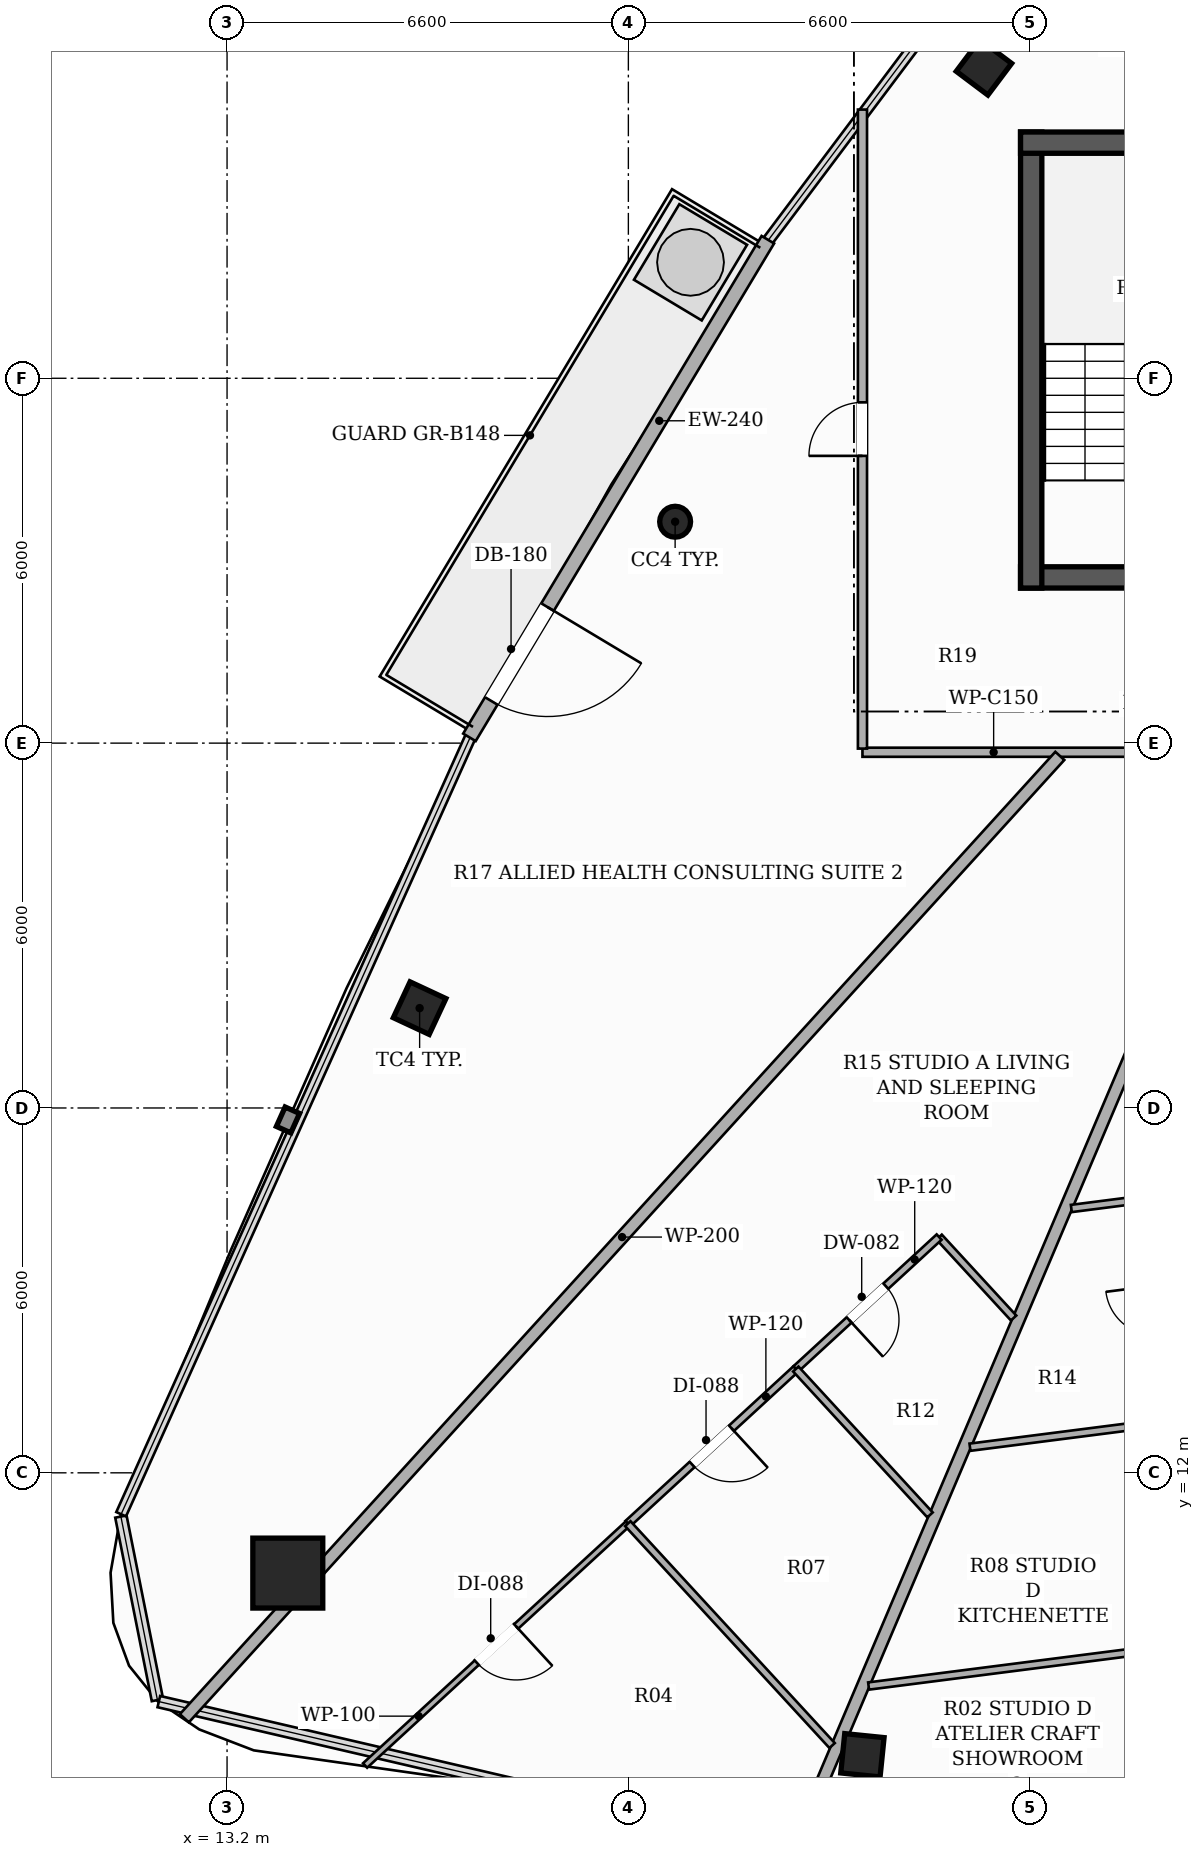
"""IFC4 building model, lengths in metres.
Left out: names, types, materials, properties, quantities, classifications, styles, units other than length and angle.
Written with IfcOpenShell. Run it as: python <this file> out.ifc"""

import sys

from ifc_helpers import new_model, si_unit, direction, frame, frame_2d, origin, origin_2d, place, context, subcontext, project, spatial, rectangle, hollow_rectangle, hollow_circle, extrude, element, fill, save


model = new_model("IFC4")
c1 = context("Model", 3, precision=1e-05, world=origin(), true_north=direction((0.0, 1.0)))
c2 = subcontext(c1, "Body", "Model", "MODEL_VIEW")
j1 = project(units=[si_unit("LENGTHUNIT", "METRE"), si_unit("PLANEANGLEUNIT", "RADIAN")], contexts=[c1])
p1 = place(None, origin())
s1 = spatial("IfcSite", under=j1, at=p1, CompositionType="ELEMENT")
p2 = place(p1, origin())
s2 = spatial("IfcBuilding", under=s1, at=p2, CompositionType="ELEMENT")
p3 = place(p2, frame((0.0, 0.0, 270.05)))
s3 = spatial("IfcBuildingStorey", under=s2, at=p3, CompositionType="ELEMENT", Elevation=270.05)
p4 = place(p3, frame((26.25, 26.725, 0.0), z_axis=(0.0, 0.0, 1.0), x_axis=(1.0, 0.0, 0.0)))
e1 = element("IfcWall", 1, at=p4, inside=s3, PredefinedType="SHEAR", context=c2, shape_type="SweptSolid", body=[
    extrude(rectangle(XDim=13.5, YDim=0.35, at=frame_2d((6.75, 0.0))), origin(), (0.0, 0.0, 1.0), 3.3),
])
p5 = place(p4, frame((4.35, 0.0, 0.0)))
e2 = element("IfcOpeningElement", 2, at=p5, cuts=e1, PredefinedType="OPENING", context=c2, shape_type="SweptSolid", body=[
    extrude(rectangle(XDim=1.05, YDim=2.15, at=frame_2d((0.525, 1.075))), frame((0.0, 0.185, 0.0), z_axis=(0.0, -1.0, 0.0), x_axis=(1.0, 0.0, 0.0)), (0.0, 0.0, 1.0), 0.37),
])
p6 = place(p4, frame((8.3, 0.0, 0.0)))
e3 = element("IfcOpeningElement", 3, at=p6, cuts=e1, PredefinedType="OPENING", context=c2, shape_type="SweptSolid", body=[
    extrude(rectangle(XDim=1.05, YDim=2.15, at=frame_2d((0.525, 1.075))), frame((0.0, 0.185, 0.0), z_axis=(0.0, -1.0, 0.0), x_axis=(1.0, 0.0, 0.0)), (0.0, 0.0, 1.0), 0.37),
])
p7 = place(p3, frame((26.425, 26.55, 0.0), z_axis=(0.0, 0.0, 1.0), x_axis=(0.0, 1.0, 0.0)))
e4 = element("IfcWall", 4, at=p7, inside=s3, PredefinedType="SHEAR", context=c2, shape_type="SweptSolid", body=[
    extrude(rectangle(XDim=7.5, YDim=0.35, at=frame_2d((3.75, 0.0))), origin(), (0.0, 0.0, 1.0), 3.3),
])
p8 = place(p3, frame((26.25, 33.875, 0.0), z_axis=(0.0, 0.0, 1.0), x_axis=(1.0, 0.0, 0.0)))
e5 = element("IfcWall", 5, at=p8, inside=s3, PredefinedType="SHEAR", context=c2, shape_type="SweptSolid", body=[
    extrude(rectangle(XDim=3.6, YDim=0.35, at=frame_2d((1.8, 0.0))), origin(), (0.0, 0.0, 1.0), 3.3),
])
p9 = place(p3, frame((14.199, 10.351, 0.0), z_axis=(0.0, 0.0, 1.0), x_axis=(1.0, 0.0, 0.0)))
e6 = element("IfcColumn", 6, at=p9, inside=s3, PredefinedType="COLUMN", context=c2, shape_type="SweptSolid", body=[
    extrude(hollow_rectangle(XDim=1.15, YDim=1.15, WallThickness=0.036, at=origin_2d()), origin(), (0.0, 0.0, 1.0), 3.3),
])
p10 = place(p3, frame((25.648, 35.113, 0.0), z_axis=(0.0, 0.0, 1.0), x_axis=(0.600420225326, 0.799684658487, 0.0)))
e7 = element("IfcColumn", 7, at=p10, inside=s3, PredefinedType="COLUMN", context=c2, shape_type="SweptSolid", body=[
    extrude(hollow_rectangle(XDim=0.65, YDim=0.65, WallThickness=0.022, at=origin_2d()), origin(), (0.0, 0.0, 1.0), 3.3),
])
p11 = place(p3, frame((20.569, 27.641, 0.0), z_axis=(0.0, 0.0, 1.0), x_axis=(1.0, 0.0, 0.0)))
e8 = element("IfcColumn", 8, at=p11, inside=s3, PredefinedType="COLUMN", context=c2, shape_type="SweptSolid", body=[
    extrude(hollow_circle(Radius=0.254, WallThickness=0.016, at=origin_2d()), origin(), (0.0, 0.0, 1.0), 3.3),
])
for number, where, z_axis, x_axis in (
    (9, (16.367, 19.642, 0.0), (0.0, 0.0, 1.0), (0.423, 0.906, 0.0)),
    (10, (23.649, 7.355, 0.0), (0.0, 0.0, 1.0), (-0.995, 0.101, 0.0)),
):
    element("IfcColumn", number, at=place(p3, frame(where, z_axis=z_axis, x_axis=x_axis)), inside=s3, PredefinedType="COLUMN", context=c2, shape_type="SweptSolid", body=[
        extrude(hollow_rectangle(XDim=0.65, YDim=0.65, WallThickness=0.022, at=origin_2d()), origin(), (0.0, 0.0, 1.0), 3.3),
    ])
p12 = place(p3, frame((22.094, 32.279, 0.0), z_axis=(0.0, 0.0, 1.0), x_axis=(-0.514303866757, -0.857608029719, 0.0)))
e11 = element("IfcWall", 11, at=p12, inside=s3, PredefinedType="SOLIDWALL", context=c2, shape_type="SweptSolid", body=[
    extrude(rectangle(XDim=9.543, YDim=0.24, at=frame_2d((4.771, 0.0))), origin(), (0.0, 0.0, 1.0), 2.624),
])
p13 = place(p12, frame((7.045, 0.0, 0.0)))
e12 = element("IfcOpeningElement", 12, at=p13, cuts=e11, PredefinedType="OPENING", context=c2, shape_type="SweptSolid", body=[
    extrude(rectangle(XDim=1.8, YDim=2.2, at=frame_2d((0.9, 1.1))), frame((0.0, 0.13, 0.0), z_axis=(0.0, -1.0, 0.0), x_axis=(1.0, 0.0, 0.0)), (0.0, 0.0, 1.0), 0.26),
])
p14 = place(p3, frame((32.168, 23.85, 0.0), z_axis=(0.0, 0.0, 1.0), x_axis=(-1.0, 0.0, 0.0)))
e13 = element("IfcWall", 13, at=p14, inside=s3, PredefinedType="PARTITIONING", context=c2, shape_type="SweptSolid", body=[
    extrude(rectangle(XDim=8.518, YDim=0.15, at=frame_2d((4.259, 0.0))), origin(), (0.0, 0.0, 1.0), 2.565),
])
p15 = place(p14, frame((3.183, 0.0, 0.0)))
e14 = element("IfcOpeningElement", 14, at=p15, cuts=e13, PredefinedType="OPENING", context=c2, shape_type="SweptSolid", body=[
    extrude(rectangle(XDim=0.92, YDim=2.15, at=frame_2d((0.46, 1.075))), frame((0.0, 0.085, 0.0), z_axis=(0.0, -1.0, 0.0), x_axis=(1.0, 0.0, 0.0)), (0.0, 0.0, 1.0), 0.17),
])
p16 = place(p14, frame((0.882, 0.0, 0.0)))
e15 = element("IfcOpeningElement", 15, at=p16, cuts=e13, PredefinedType="OPENING", context=c2, shape_type="SweptSolid", body=[
    extrude(rectangle(XDim=0.92, YDim=2.15, at=frame_2d((0.46, 1.075))), frame((0.0, 0.085, 0.0), z_axis=(0.0, -1.0, 0.0), x_axis=(1.0, 0.0, 0.0)), (0.0, 0.0, 1.0), 0.17),
])
p17 = place(p3, frame((23.65, 23.91, 0.0), z_axis=(0.0, 0.0, 1.0), x_axis=(0.0, 1.0, 0.0)))
e16 = element("IfcWall", 16, at=p17, inside=s3, PredefinedType="PARTITIONING", context=c2, shape_type="SweptSolid", body=[
    extrude(rectangle(XDim=10.509, YDim=0.15, at=frame_2d((5.254, 0.0))), origin(), (0.0, 0.0, 1.0), 2.492),
])
p18 = place(p17, frame((4.814, 0.0, 0.0)))
e17 = element("IfcOpeningElement", 17, at=p18, cuts=e16, PredefinedType="OPENING", context=c2, shape_type="SweptSolid", body=[
    extrude(rectangle(XDim=0.88, YDim=2.1, at=frame_2d((0.44, 1.05))), frame((0.0, 0.085, 0.0), z_axis=(0.0, -1.0, 0.0), x_axis=(1.0, 0.0, 0.0)), (0.0, 0.0, 1.0), 0.17),
])
p19 = place(p3, frame((26.896, 23.79, 0.0), z_axis=(0.0, 0.0, 1.0), x_axis=(-0.672947642337, -0.739690118004, 0.0)))
e18 = element("IfcWall", 18, at=p19, inside=s3, PredefinedType="PARTITIONING", context=c2, shape_type="SweptSolid", body=[
    extrude(rectangle(XDim=21.395, YDim=0.2, at=frame_2d((10.698, 0.0))), origin(), (0.0, 0.0, 1.0), 2.492),
])
p20 = place(p3, frame((30.152, 23.79, 0.0), z_axis=(0.0, 0.0, 1.0), x_axis=(-0.390757480658, -0.920493667175, 0.0)))
e19 = element("IfcWall", 19, at=p20, inside=s3, PredefinedType="PARTITIONING", context=c2, shape_type="SweptSolid", body=[
    extrude(rectangle(XDim=19.053, YDim=0.2, at=frame_2d((9.526, 0.0))), origin(), (0.0, 0.0, 1.0), 2.492),
])
p21 = place(p3, frame((26.136, 14.546, 0.0), z_axis=(0.0, 0.0, 1.0), x_axis=(-0.67721439392, 0.735785746443, 0.0)))
e20 = element("IfcWall", 20, at=p21, inside=s3, PredefinedType="PARTITIONING", context=c2, shape_type="SweptSolid", body=[
    extrude(rectangle(XDim=1.809, YDim=0.12, at=frame_2d((0.905, 0.0))), origin(), (0.0, 0.0, 1.0), 2.773),
])
p22 = place(p3, frame((24.911, 15.877, 0.0), z_axis=(0.0, 0.0, 1.0), x_axis=(-0.735690989841, -0.677317331438, 0.0)))
e21 = element("IfcWall", 21, at=p22, inside=s3, PredefinedType="PARTITIONING", context=c2, shape_type="SweptSolid", body=[
    extrude(rectangle(XDim=3.204, YDim=0.12, at=frame_2d((1.602, 0.0))), origin(), (0.0, 0.0, 1.0), 3.06),
])
p23 = place(p22, frame((1.192, 0.0, 0.0)))
e22 = element("IfcOpeningElement", 22, at=p23, cuts=e21, PredefinedType="OPENING", context=c2, shape_type="SweptSolid", body=[
    extrude(rectangle(XDim=0.82, YDim=2.1, at=frame_2d((0.41, 1.05))), frame((0.0, 0.07, 0.0), z_axis=(0.0, -1.0, 0.0), x_axis=(1.0, 0.0, 0.0)), (0.0, 0.0, 1.0), 0.14),
])
p24 = place(p3, frame((22.554, 13.707, 0.0), z_axis=(0.0, 0.0, 1.0), x_axis=(-0.735789751444, -0.677210042506, 0.0)))
e23 = element("IfcWall", 23, at=p24, inside=s3, PredefinedType="PARTITIONING", context=c2, shape_type="SweptSolid", body=[
    extrude(rectangle(XDim=3.755, YDim=0.12, at=frame_2d((1.877, 0.0))), origin(), (0.0, 0.0, 1.0), 2.773),
])
p25 = place(p24, frame((1.438, 0.0, 0.0)))
e24 = element("IfcOpeningElement", 24, at=p25, cuts=e23, PredefinedType="OPENING", context=c2, shape_type="SweptSolid", body=[
    extrude(rectangle(XDim=0.88, YDim=2.1, at=frame_2d((0.44, 1.05))), frame((0.0, 0.07, 0.0), z_axis=(0.0, -1.0, 0.0), x_axis=(1.0, 0.0, 0.0)), (0.0, 0.0, 1.0), 0.14),
])
p26 = place(p3, frame((19.791, 11.164, 0.0), z_axis=(0.0, 0.0, 1.0), x_axis=(-0.735787653784, -0.677212321608, 0.0)))
e25 = element("IfcWall", 25, at=p26, inside=s3, PredefinedType="PARTITIONING", context=c2, shape_type="SweptSolid", body=[
    extrude(rectangle(XDim=5.873, YDim=0.1, at=frame_2d((2.936, 0.0))), origin(), (0.0, 0.0, 1.0), 2.492),
])
p27 = place(p26, frame((2.496, 0.0, 0.0)))
e26 = element("IfcOpeningElement", 26, at=p27, cuts=e25, PredefinedType="OPENING", context=c2, shape_type="SweptSolid", body=[
    extrude(rectangle(XDim=0.88, YDim=2.1, at=frame_2d((0.44, 1.05))), frame((0.0, 0.06, 0.0), z_axis=(0.0, -1.0, 0.0), x_axis=(1.0, 0.0, 0.0)), (0.0, 0.0, 1.0), 0.12),
])
p28 = place(p3, frame((24.761, 11.308, 0.0), z_axis=(0.0, 0.0, 1.0), x_axis=(-0.677059775875, 0.735928026299, 0.0)))
e27 = element("IfcWall", 27, at=p28, inside=s3, PredefinedType="PARTITIONING", context=c2, shape_type="SweptSolid", body=[
    extrude(rectangle(XDim=3.26, YDim=0.12, at=frame_2d((1.63, 0.0))), origin(), (0.0, 0.0, 1.0), 2.773),
])
p29 = place(p3, frame((23.151, 7.515, 0.0), z_axis=(0.0, 0.0, 1.0), x_axis=(-0.677343302262, 0.735667078834, 0.0)))
e28 = element("IfcWall", 28, at=p29, inside=s3, PredefinedType="PARTITIONING", context=c2, shape_type="SweptSolid", body=[
    extrude(rectangle(XDim=4.96, YDim=0.12, at=frame_2d((2.48, 0.0))), origin(), (0.0, 0.0, 1.0), 2.492),
])
p30 = place(p3, frame((28.285, 16.501, 0.0), z_axis=(0.0, 0.0, 1.0), x_axis=(-0.991859459137, -0.127337399535, 0.0)))
e29 = element("IfcWall", 29, at=p30, inside=s3, PredefinedType="PARTITIONING", context=c2, shape_type="SweptSolid", body=[
    extrude(rectangle(XDim=1.21, YDim=0.12, at=frame_2d((0.605, 0.0))), origin(), (0.0, 0.0, 1.0), 3.06),
])
p31 = place(p3, frame((28.753, 12.848, 0.0), z_axis=(0.0, 0.0, 1.0), x_axis=(-0.991902552373, -0.127001285805, 0.0)))
e30 = element("IfcWall", 30, at=p31, inside=s3, PredefinedType="PARTITIONING", context=c2, shape_type="SweptSolid", body=[
    extrude(rectangle(XDim=3.362, YDim=0.12, at=frame_2d((1.681, 0.0))), origin(), (0.0, 0.0, 1.0), 2.773),
])
p32 = place(p3, frame((29.222, 9.195, 0.0), z_axis=(0.0, 0.0, 1.0), x_axis=(-0.991886960484, -0.127123001942, 0.0)))
e31 = element("IfcWall", 31, at=p32, inside=s3, PredefinedType="PARTITIONING", context=c2, shape_type="SweptSolid", body=[
    extrude(rectangle(XDim=5.516, YDim=0.12, at=frame_2d((2.758, 0.0))), origin(), (0.0, 0.0, 1.0), 2.773),
])
p33 = place(p13, origin())
e32 = element("IfcDoor", 32, at=p33, inside=s3, OperationType="SINGLE_SWING_LEFT", PredefinedType="DOOR", context=c2, shape_type="SweptSolid", body=[
    extrude(rectangle(XDim=1.8, YDim=2.2, at=frame_2d((0.9, 1.1))), frame((0.0, 0.025, 0.0), z_axis=(0.0, -1.0, 0.0), x_axis=(1.0, 0.0, 0.0)), (0.0, 0.0, 1.0), 0.05),
])
fill(e12, e32)
p34 = place(p18, origin())
e33 = element("IfcDoor", 33, at=p34, inside=s3, OperationType="SINGLE_SWING_LEFT", PredefinedType="DOOR", context=c2, shape_type="SweptSolid", body=[
    extrude(rectangle(XDim=0.88, YDim=2.1, at=frame_2d((0.44, 1.05))), frame((0.0, 0.025, 0.0), z_axis=(0.0, -1.0, 0.0), x_axis=(1.0, 0.0, 0.0)), (0.0, 0.0, 1.0), 0.05),
])
fill(e17, e33)
p35 = place(p23, origin())
e34 = element("IfcDoor", 34, at=p35, inside=s3, OperationType="SINGLE_SWING_RIGHT", PredefinedType="DOOR", context=c2, shape_type="SweptSolid", body=[
    extrude(rectangle(XDim=0.82, YDim=2.1, at=frame_2d((0.41, 1.05))), frame((0.0, 0.025, 0.0), z_axis=(0.0, -1.0, 0.0), x_axis=(1.0, 0.0, 0.0)), (0.0, 0.0, 1.0), 0.05),
])
fill(e22, e34)
p36 = place(p25, origin())
e35 = element("IfcDoor", 35, at=p36, inside=s3, OperationType="SINGLE_SWING_LEFT", PredefinedType="DOOR", context=c2, shape_type="SweptSolid", body=[
    extrude(rectangle(XDim=0.88, YDim=2.1, at=frame_2d((0.44, 1.05))), frame((0.0, 0.025, 0.0), z_axis=(0.0, -1.0, 0.0), x_axis=(1.0, 0.0, 0.0)), (0.0, 0.0, 1.0), 0.05),
])
fill(e24, e35)
p37 = place(p27, origin())
e36 = element("IfcDoor", 36, at=p37, inside=s3, OperationType="SINGLE_SWING_LEFT", PredefinedType="DOOR", context=c2, shape_type="SweptSolid", body=[
    extrude(rectangle(XDim=0.88, YDim=2.1, at=frame_2d((0.44, 1.05))), frame((0.0, 0.025, 0.0), z_axis=(0.0, -1.0, 0.0), x_axis=(1.0, 0.0, 0.0)), (0.0, 0.0, 1.0), 0.05),
])
fill(e26, e36)
save(model, sys.argv[1])
